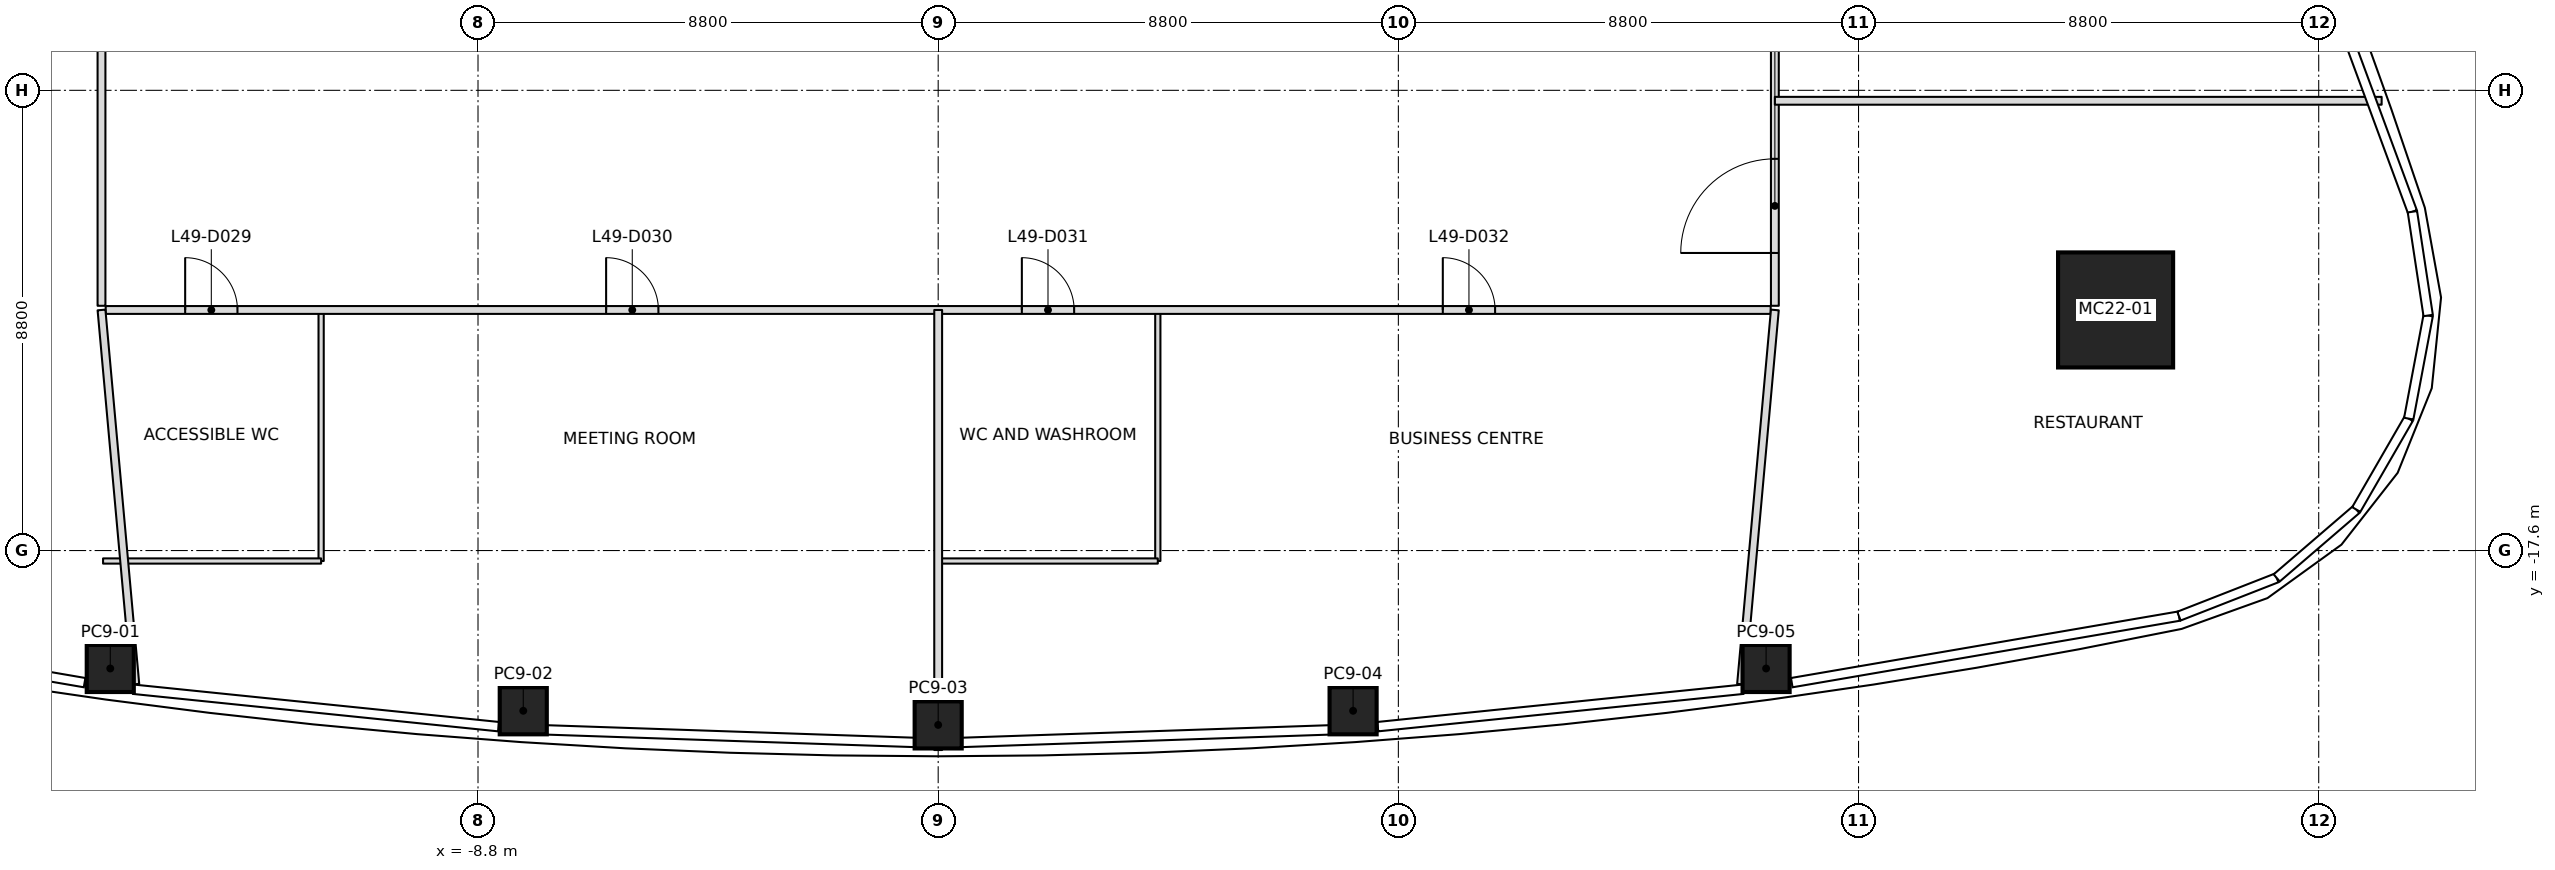
"""IFC4 building model, lengths in metres.
Left out: names, types, materials, properties, quantities, classifications, styles, units other than length and angle.
Written with IfcOpenShell. Run it as: python <this file> out.ifc"""

import sys

from ifc_helpers import new_model, si_unit, direction, frame, frame_2d, origin, origin_2d, place, context, subcontext, project, spatial, rectangle, extrude, clip, halfspace, element, fill, save


model = new_model("IFC4")
c1 = context("Model", 3, precision=1e-05, world=origin(), true_north=direction((0.0, 1.0)))
c2 = subcontext(c1, "Body", "Model", "MODEL_VIEW")
j1 = project(units=[si_unit("LENGTHUNIT", "METRE"), si_unit("PLANEANGLEUNIT", "RADIAN")], contexts=[c1])
p1 = place(None, origin())
s1 = spatial("IfcSite", under=j1, at=p1, CompositionType="ELEMENT")
p2 = place(p1, origin())
s2 = spatial("IfcBuilding", under=s1, at=p2, CompositionType="ELEMENT")
p3 = place(p2, frame((0.0, 0.0, 219.8)))
s3 = spatial("IfcBuildingStorey", under=s2, at=p3, CompositionType="ELEMENT", Elevation=219.8)
p4 = place(p3, frame((22.516, -13.0, 0.0), z_axis=(-0.015527667253, 0.008950445753, 0.999839377635), x_axis=(0.999879438507, 0.000138996301, 0.015527045126)))
e1 = element("IfcColumn", 1, at=p4, inside=s3, PredefinedType="COLUMN", context=c2, shape_type="SweptSolid", body=[
    clip(clip(extrude(rectangle(XDim=2.2, YDim=2.2, at=origin_2d()), origin(), (0.0, 0.0, 1.0), 7.201), halfspace(frame((0.0, 0.0, 0.003)), True)), halfspace(frame((0.0, 0.0, 7.19)), False)),
])
p5 = place(p3, frame((-15.832, -19.855, 0.0), z_axis=(0.009731160111, 0.005764101808, 0.999936037781), x_axis=(-0.990706613393, 0.135727393239, 0.008858944803)))
e2 = element("IfcColumn", 2, at=p5, inside=s3, PredefinedType="COLUMN", context=c2, shape_type="SweptSolid", body=[
    clip(clip(extrude(rectangle(XDim=0.9, YDim=0.9, at=origin_2d()), origin(), (0.0, 0.0, 1.0), 7.2), halfspace(frame((0.0, 0.0, 0.001)), True)), halfspace(frame((0.0, 0.0, 7.197)), False)),
])
p6 = place(p3, frame((-7.935, -20.664, 0.0), z_axis=(0.004882692374, 0.006238995811, 0.999968616631), x_axis=(-0.9976738103, 0.068023464771, 0.004447075758)))
e3 = element("IfcColumn", 3, at=p6, inside=s3, PredefinedType="COLUMN", context=c2, shape_type="SweptSolid", body=[
    clip(clip(extrude(rectangle(XDim=0.9, YDim=0.9, at=origin_2d()), origin(), (0.0, 0.0, 1.0), 7.2), halfspace(frame((0.0, 0.0, 0.001)), True)), halfspace(frame((0.0, 0.0, 7.198)), False)),
])
p7 = place(p3, frame((0.0, -20.934, 0.0), z_axis=(0.0, 0.006340790097, 0.999979896988), x_axis=(1.0, 0.0, 0.0)))
e4 = element("IfcColumn", 4, at=p7, inside=s3, PredefinedType="COLUMN", context=c2, shape_type="SweptSolid", body=[
    clip(clip(extrude(rectangle(XDim=0.9, YDim=0.9, at=origin_2d()), origin(), (0.0, 0.0, 1.0), 7.2), halfspace(frame((0.0, 0.0, 0.0)), True)), halfspace(frame((0.0, 0.0, 7.199)), False)),
])
p8 = place(p3, frame((7.935, -20.664, 0.0), z_axis=(-0.004882692374, 0.006238995811, 0.999968616631), x_axis=(0.9976738103, 0.068023464771, 0.004447075758)))
e5 = element("IfcColumn", 5, at=p8, inside=s3, PredefinedType="COLUMN", context=c2, shape_type="SweptSolid", body=[
    clip(clip(extrude(rectangle(XDim=0.9, YDim=0.9, at=origin_2d()), origin(), (0.0, 0.0, 1.0), 7.2), halfspace(frame((0.0, 0.0, 0.001)), True)), halfspace(frame((0.0, 0.0, 7.198)), False)),
])
p9 = place(p3, frame((15.832, -19.855, 0.0), z_axis=(-0.009731160111, 0.005764101808, 0.999936037781), x_axis=(0.990706613393, 0.135727393239, 0.008858944803)))
e6 = element("IfcColumn", 6, at=p9, inside=s3, PredefinedType="COLUMN", context=c2, shape_type="SweptSolid", body=[
    clip(clip(extrude(rectangle(XDim=0.9, YDim=0.9, at=origin_2d()), origin(), (0.0, 0.0, 1.0), 7.2), halfspace(frame((0.0, 0.0, 0.001)), True)), halfspace(frame((0.0, 0.0, 7.197)), False)),
])
p10 = place(p3, frame((-16.0, -13.0, 0.0), z_axis=(0.0, 0.0, 1.0), x_axis=(0.089975086332, -0.995944016418, 0.0)))
e7 = element("IfcWall", 7, at=p10, inside=s3, PredefinedType="PARTITIONING", context=c2, shape_type="SweptSolid", body=[
    extrude(rectangle(XDim=7.185, YDim=0.15, at=frame_2d((3.593, 0.0))), origin(), (0.0, 0.0, 1.0), 6.284),
])
p11 = place(p3, frame((0.0, -13.0, 0.0), z_axis=(0.0, 0.0, 1.0), x_axis=(0.0, -1.0, 0.0)))
e8 = element("IfcWall", 8, at=p11, inside=s3, PredefinedType="PARTITIONING", context=c2, shape_type="SweptSolid", body=[
    extrude(rectangle(XDim=8.414, YDim=0.15, at=frame_2d((4.207, 0.0))), origin(), (0.0, 0.0, 1.0), 6.5),
])
p12 = place(p3, frame((16.0, -13.0, 0.0), z_axis=(0.0, 0.0, 1.0), x_axis=(-0.089975086332, -0.995944016418, 0.0)))
e9 = element("IfcWall", 9, at=p12, inside=s3, PredefinedType="PARTITIONING", context=c2, shape_type="SweptSolid", body=[
    extrude(rectangle(XDim=7.185, YDim=0.15, at=frame_2d((3.593, 0.0))), origin(), (0.0, 0.0, 1.0), 6.284),
])
p13 = place(p3, frame((16.0, -9.0, 0.0), z_axis=(0.0, 0.0, 1.0), x_axis=(1.0, 0.0, 0.0)))
e10 = element("IfcWall", 10, at=p13, inside=s3, PredefinedType="PARTITIONING", context=c2, shape_type="SweptSolid", body=[
    extrude(rectangle(XDim=11.604, YDim=0.15, at=frame_2d((5.802, 0.0))), origin(), (0.0, 0.0, 1.0), 6.434),
])
p14 = place(p3, frame((-16.0, 12.92, 0.0), z_axis=(0.0, 0.0, 1.0), x_axis=(0.0, -1.0, 0.0)))
e11 = element("IfcWall", 11, at=p14, inside=s3, PredefinedType="PARTITIONING", context=c2, shape_type="SweptSolid", body=[
    extrude(rectangle(XDim=25.84, YDim=0.15, at=frame_2d((12.92, 0.0))), origin(), (0.0, 0.0, 1.0), 6.367),
])
p15 = place(p14, frame((12.43, 0.0, 0.0)))
e12 = element("IfcOpeningElement", 12, at=p15, cuts=e11, PredefinedType="OPENING", context=c2, shape_type="SweptSolid", body=[
    extrude(rectangle(XDim=1.0, YDim=2.1, at=frame_2d((0.5, 1.05))), frame((0.0, 0.075, 0.0), z_axis=(0.0, -1.0, 0.0), x_axis=(1.0, 0.0, 0.0)), (0.0, 0.0, 1.0), 0.15),
])
p16 = place(p3, frame((-15.92, -13.0, 0.0), z_axis=(0.0, 0.0, 1.0), x_axis=(1.0, 0.0, 0.0)))
e13 = element("IfcWall", 13, at=p16, inside=s3, PredefinedType="PARTITIONING", context=c2, shape_type="SweptSolid", body=[
    extrude(rectangle(XDim=31.84, YDim=0.15, at=frame_2d((15.92, 0.0))), origin(), (0.0, 0.0, 1.0), 6.367),
])
p17 = place(p16, frame((1.52, 0.0, 0.0)))
e14 = element("IfcOpeningElement", 14, at=p17, cuts=e13, PredefinedType="OPENING", context=c2, shape_type="SweptSolid", body=[
    extrude(rectangle(XDim=1.0, YDim=2.1, at=frame_2d((0.5, 1.05))), frame((0.0, 0.075, 0.0), z_axis=(0.0, -1.0, 0.0), x_axis=(1.0, 0.0, 0.0)), (0.0, 0.0, 1.0), 0.15),
])
p18 = place(p16, frame((9.57, 0.0, 0.0)))
e15 = element("IfcOpeningElement", 15, at=p18, cuts=e13, PredefinedType="OPENING", context=c2, shape_type="SweptSolid", body=[
    extrude(rectangle(XDim=1.0, YDim=2.1, at=frame_2d((0.5, 1.05))), frame((0.0, 0.075, 0.0), z_axis=(0.0, -1.0, 0.0), x_axis=(1.0, 0.0, 0.0)), (0.0, 0.0, 1.0), 0.15),
])
p19 = place(p16, frame((17.52, 0.0, 0.0)))
e16 = element("IfcOpeningElement", 16, at=p19, cuts=e13, PredefinedType="OPENING", context=c2, shape_type="SweptSolid", body=[
    extrude(rectangle(XDim=1.0, YDim=2.1, at=frame_2d((0.5, 1.05))), frame((0.0, 0.075, 0.0), z_axis=(0.0, -1.0, 0.0), x_axis=(1.0, 0.0, 0.0)), (0.0, 0.0, 1.0), 0.15),
])
p20 = place(p16, frame((25.57, 0.0, 0.0)))
e17 = element("IfcOpeningElement", 17, at=p20, cuts=e13, PredefinedType="OPENING", context=c2, shape_type="SweptSolid", body=[
    extrude(rectangle(XDim=1.0, YDim=2.1, at=frame_2d((0.5, 1.05))), frame((0.0, 0.075, 0.0), z_axis=(0.0, -1.0, 0.0), x_axis=(1.0, 0.0, 0.0)), (0.0, 0.0, 1.0), 0.15),
])
p21 = place(p3, frame((16.0, -12.92, 0.0), z_axis=(0.0, 0.0, 1.0), x_axis=(0.0, 1.0, 0.0)))
e18 = element("IfcWall", 18, at=p21, inside=s3, PredefinedType="PARTITIONING", context=c2, shape_type="SweptSolid", body=[
    extrude(rectangle(XDim=25.84, YDim=0.15, at=frame_2d((12.92, 0.0))), origin(), (0.0, 0.0, 1.0), 6.433),
])
p22 = place(p21, frame((1.01, 0.0, 0.0)))
e19 = element("IfcOpeningElement", 19, at=p22, cuts=e18, PredefinedType="OPENING", context=c2, shape_type="SweptSolid", body=[
    extrude(rectangle(XDim=1.8, YDim=2.1, at=frame_2d((0.9, 1.05))), frame((0.0, 0.075, 0.0), z_axis=(0.0, -1.0, 0.0), x_axis=(1.0, 0.0, 0.0)), (0.0, 0.0, 1.0), 0.15),
])
p23 = place(p21, frame((14.42, 0.0, 0.0)))
e20 = element("IfcOpeningElement", 20, at=p23, cuts=e18, PredefinedType="OPENING", context=c2, shape_type="SweptSolid", body=[
    extrude(rectangle(XDim=1.0, YDim=2.1, at=frame_2d((0.5, 1.05))), frame((0.0, 0.075, 0.0), z_axis=(0.0, -1.0, 0.0), x_axis=(1.0, 0.0, 0.0)), (0.0, 0.0, 1.0), 0.15),
])
p24 = place(p3, frame((-11.8, -13.03, 0.0), z_axis=(0.0, 0.0, 1.0), x_axis=(0.0, -1.0, 0.0)))
e21 = element("IfcWall", 21, at=p24, inside=s3, PredefinedType="PARTITIONING", context=c2, shape_type="SweptSolid", body=[
    extrude(rectangle(XDim=4.77, YDim=0.1, at=frame_2d((2.385, 0.0))), origin(), (0.0, 0.0, 1.0), 6.5),
])
p25 = place(p3, frame((-11.8, -17.8, 0.0), z_axis=(0.0, 0.0, 1.0), x_axis=(-1.0, 0.0, 0.0)))
e22 = element("IfcWall", 22, at=p25, inside=s3, PredefinedType="PARTITIONING", context=c2, shape_type="SweptSolid", body=[
    extrude(rectangle(XDim=4.17, YDim=0.1, at=frame_2d((2.085, 0.0))), origin(), (0.0, 0.0, 1.0), 6.493),
])
p26 = place(p3, frame((4.2, -13.03, 0.0), z_axis=(0.0, 0.0, 1.0), x_axis=(0.0, -1.0, 0.0)))
e23 = element("IfcWall", 23, at=p26, inside=s3, PredefinedType="PARTITIONING", context=c2, shape_type="SweptSolid", body=[
    extrude(rectangle(XDim=4.77, YDim=0.1, at=frame_2d((2.385, 0.0))), origin(), (0.0, 0.0, 1.0), 6.5),
])
p27 = place(p3, frame((4.2, -17.8, 0.0), z_axis=(0.0, 0.0, 1.0), x_axis=(-1.0, 0.0, 0.0)))
e24 = element("IfcWall", 24, at=p27, inside=s3, PredefinedType="PARTITIONING", context=c2, shape_type="SweptSolid", body=[
    extrude(rectangle(XDim=4.17, YDim=0.1, at=frame_2d((2.085, 0.0))), origin(), (0.0, 0.0, 1.0), 6.367),
])
p28 = place(p17, origin())
e25 = element("IfcDoor", 25, at=p28, inside=s3, OperationType="SINGLE_SWING_RIGHT", PredefinedType="DOOR", context=c2, shape_type="SweptSolid", body=[
    extrude(rectangle(XDim=1.0, YDim=2.1, at=frame_2d((0.5, 1.05))), frame((0.0, 0.025, 0.0), z_axis=(0.0, -1.0, 0.0), x_axis=(1.0, 0.0, 0.0)), (0.0, 0.0, 1.0), 0.05),
])
fill(e14, e25)
p29 = place(p18, origin())
e26 = element("IfcDoor", 26, at=p29, inside=s3, OperationType="SINGLE_SWING_RIGHT", PredefinedType="DOOR", context=c2, shape_type="SweptSolid", body=[
    extrude(rectangle(XDim=1.0, YDim=2.1, at=frame_2d((0.5, 1.05))), frame((0.0, 0.025, 0.0), z_axis=(0.0, -1.0, 0.0), x_axis=(1.0, 0.0, 0.0)), (0.0, 0.0, 1.0), 0.05),
])
fill(e15, e26)
p30 = place(p19, origin())
e27 = element("IfcDoor", 27, at=p30, inside=s3, OperationType="SINGLE_SWING_LEFT", PredefinedType="DOOR", context=c2, shape_type="SweptSolid", body=[
    extrude(rectangle(XDim=1.0, YDim=2.1, at=frame_2d((0.5, 1.05))), frame((0.0, 0.025, 0.0), z_axis=(0.0, -1.0, 0.0), x_axis=(1.0, 0.0, 0.0)), (0.0, 0.0, 1.0), 0.05),
])
fill(e16, e27)
p31 = place(p20, origin())
e28 = element("IfcDoor", 28, at=p31, inside=s3, OperationType="SINGLE_SWING_RIGHT", PredefinedType="DOOR", context=c2, shape_type="SweptSolid", body=[
    extrude(rectangle(XDim=1.0, YDim=2.1, at=frame_2d((0.5, 1.05))), frame((0.0, 0.025, 0.0), z_axis=(0.0, -1.0, 0.0), x_axis=(1.0, 0.0, 0.0)), (0.0, 0.0, 1.0), 0.05),
])
fill(e17, e28)
p32 = place(p22, origin())
e29 = element("IfcDoor", 29, at=p32, inside=s3, OperationType="DOUBLE_DOOR_SINGLE_SWING", PredefinedType="DOOR", context=c2, shape_type="SweptSolid", body=[
    extrude(rectangle(XDim=1.8, YDim=2.1, at=frame_2d((0.9, 1.05))), frame((0.0, 0.025, 0.0), z_axis=(0.0, -1.0, 0.0), x_axis=(1.0, 0.0, 0.0)), (0.0, 0.0, 1.0), 0.05),
])
fill(e19, e29)
save(model, sys.argv[1])
